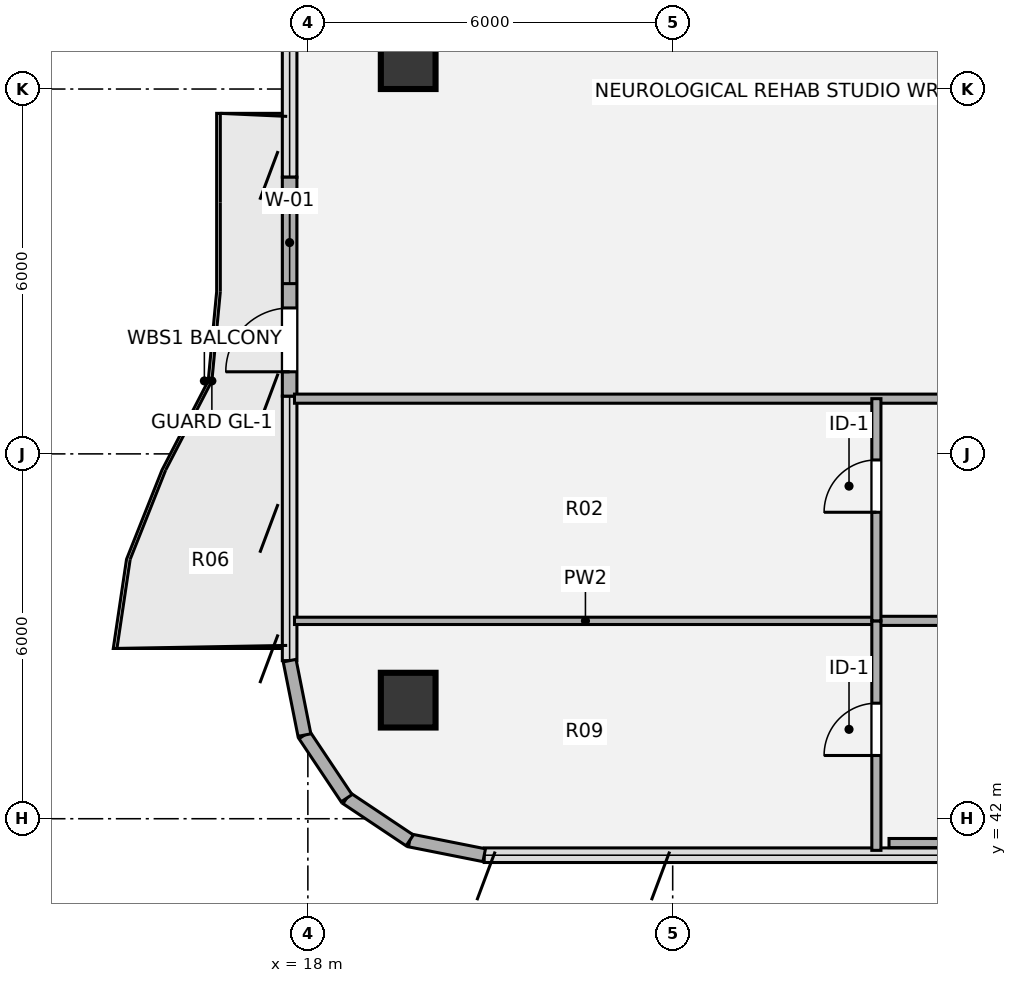
"""IFC4 building model, lengths in metres.
Left out: names, types, materials, properties, quantities, classifications, styles, units other than length and angle.
Written with IfcOpenShell. Run it as: python <this file> out.ifc"""

import sys

from ifc_helpers import new_model, si_unit, direction, frame, frame_2d, origin, origin_2d, place, context, subcontext, project, spatial, rectangle, hollow_circle, extrude, source, transform, mapped, element, fill, save


model = new_model("IFC4")
c1 = context("Model", 3, precision=1e-05, world=origin(), true_north=direction((0.0, 1.0)))
c2 = subcontext(c1, "Body", "Model", "MODEL_VIEW")
j1 = project(units=[si_unit("LENGTHUNIT", "METRE"), si_unit("PLANEANGLEUNIT", "RADIAN")], contexts=[c1])
p1 = place(None, origin())
s1 = spatial("IfcSite", under=j1, at=p1, CompositionType="ELEMENT")
p2 = place(p1, origin())
s2 = spatial("IfcBuilding", under=s1, at=p2, CompositionType="ELEMENT")
p3 = place(p2, frame((0.0, 0.0, 249.48)))
s3 = spatial("IfcBuildingStorey", under=s2, at=p3, CompositionType="ELEMENT", Elevation=249.48)
m1 = source(origin(), c2, "Body", "SweptSolid", [
    extrude(hollow_circle(Radius=0.45, WallThickness=0.032, at=origin_2d()), origin(), (0.0, 0.0, 1.0), 3.78),
])
for number, where, z_axis, x_axis in (
    (1, (19.65, 43.95, 0.0), (0.0, 0.0, 1.0), (1.0, 0.0, 0.0)),
    (2, (19.65, 54.45, 0.0), (0.0, 0.0, 1.0), (1.0, 0.0, 0.0)),
):
    element("IfcColumn", number, at=place(p3, frame(where, z_axis=z_axis, x_axis=x_axis)), inside=s3, PredefinedType="COLUMN", context=c2, shape_type="MappedRepresentation", body=[
        mapped(m1, transform((0.0, 0.0, 0.0), x_axis=(1.0, 0.0, 0.0), y_axis=(0.0, 1.0, 0.0), z_axis=(0.0, 0.0, 1.0), scale=1.0)),
    ])
for number, where, z_axis, x_axis in (
    (3, (20.9, 41.4, 0.0), (0.0, 0.0, 1.0), (-0.981, 0.195, 0.0)),
    (4, (19.675, 41.644, 0.0), (0.0, 0.0, 1.0), (-0.831, 0.556, 0.0)),
    (5, (18.637, 42.337, 0.0), (0.0, 0.0, 1.0), (-0.556, 0.831, 0.0)),
    (6, (17.944, 43.375, 0.0), (0.0, 0.0, 1.0), (-0.195, 0.981, 0.0)),
):
    element("IfcWall", number, at=place(p3, frame(where, z_axis=z_axis, x_axis=x_axis)), inside=s3, PredefinedType="SOLIDWALL", context=c2, shape_type="SweptSolid", body=[
        extrude(rectangle(XDim=1.249, YDim=0.215, at=frame_2d((0.624, 0.0))), origin(), (0.0, 0.0, 1.0), 3.53),
    ])
p4 = place(p3, frame((17.7, 48.95, 0.0), z_axis=(0.0, 0.0, 1.0), x_axis=(0.0, 1.0, 0.0)))
e7 = element("IfcWall", 7, at=p4, inside=s3, PredefinedType="SOLIDWALL", context=c2, shape_type="SweptSolid", body=[
    extrude(rectangle(XDim=3.6, YDim=0.24, at=frame_2d((1.8, 0.0))), origin(), (0.0, 0.0, 1.0), 3.53),
])
p5 = place(p4, frame((0.4, 0.0, 0.0)))
e8 = element("IfcOpeningElement", 8, at=p5, cuts=e7, PredefinedType="OPENING", context=c2, shape_type="SweptSolid", body=[
    extrude(rectangle(XDim=1.05, YDim=2.15, at=origin_2d()), frame((0.525, 0.13, 1.075), z_axis=(0.0, -1.0, 0.0), x_axis=(1.0, 0.0, 0.0)), (0.0, 0.0, 1.0), 0.26),
])
p6 = place(p4, frame((1.85, 0.0, 0.85)))
e9 = element("IfcOpeningElement", 9, at=p6, cuts=e7, PredefinedType="OPENING", context=c2, shape_type="SweptSolid", body=[
    extrude(rectangle(XDim=1.35, YDim=1.35, at=origin_2d()), frame((0.675, 0.13, 0.675), z_axis=(0.0, -1.0, 0.0), x_axis=(1.0, 0.0, 0.0)), (0.0, 0.0, 1.0), 0.26),
])
p7 = place(p3, frame((27.558, 41.6, 0.0), z_axis=(0.0, 0.0, 1.0), x_axis=(1.0, 0.0, 0.0)))
e10 = element("IfcWall", 10, at=p7, inside=s3, PredefinedType="PARTITIONING", context=c2, shape_type="SweptSolid", body=[
    extrude(rectangle(XDim=5.992, YDim=0.15, at=frame_2d((2.996, 0.0))), origin(), (0.0, 0.0, 1.0), 3.5),
])
p8 = place(p3, frame((17.78, 45.254, 0.0), z_axis=(0.0, 0.0, 1.0), x_axis=(1.0, 0.0, 0.0)))
e11 = element("IfcWall", 11, at=p8, inside=s3, PredefinedType="PARTITIONING", context=c2, shape_type="SweptSolid", body=[
    extrude(rectangle(XDim=9.57, YDim=0.12, at=frame_2d((4.785, 0.0))), origin(), (0.0, 0.0, 1.0), 2.982),
])
p9 = place(p3, frame((27.35, 45.254, 0.0), z_axis=(0.0, 0.0, 1.0), x_axis=(1.0, 0.0, 0.0)))
e12 = element("IfcWall", 12, at=p9, inside=s3, PredefinedType="PARTITIONING", context=c2, shape_type="SweptSolid", body=[
    extrude(rectangle(XDim=6.2, YDim=0.15, at=frame_2d((3.1, 0.0))), origin(), (0.0, 0.0, 1.0), 2.982),
])
p10 = place(p3, frame((17.78, 48.908, 0.0), z_axis=(0.0, 0.0, 1.0), x_axis=(1.0, 0.0, 0.0)))
e13 = element("IfcWall", 13, at=p10, inside=s3, PredefinedType="PARTITIONING", context=c2, shape_type="SweptSolid", body=[
    extrude(rectangle(XDim=15.77, YDim=0.15, at=frame_2d((7.885, 0.0))), origin(), (0.0, 0.0, 1.0), 2.982),
])
p11 = place(p3, frame((27.35, 41.48, 0.0), z_axis=(0.0, 0.0, 1.0), x_axis=(0.0, 1.0, 0.0)))
e14 = element("IfcWall", 14, at=p11, inside=s3, PredefinedType="PARTITIONING", context=c2, shape_type="SweptSolid", body=[
    extrude(rectangle(XDim=3.774, YDim=0.15, at=frame_2d((1.887, 0.0))), origin(), (0.0, 0.0, 1.0), 3.5),
])
p12 = place(p11, frame((1.56, 0.0, 0.0)))
e15 = element("IfcOpeningElement", 15, at=p12, cuts=e14, PredefinedType="OPENING", context=c2, shape_type="SweptSolid", body=[
    extrude(rectangle(XDim=0.86, YDim=2.1, at=origin_2d()), frame((0.43, 0.085, 1.05), z_axis=(0.0, -1.0, 0.0), x_axis=(1.0, 0.0, 0.0)), (0.0, 0.0, 1.0), 0.17),
])
p13 = place(p3, frame((27.35, 45.254, 0.0), z_axis=(0.0, 0.0, 1.0), x_axis=(0.0, 1.0, 0.0)))
e16 = element("IfcWall", 16, at=p13, inside=s3, PredefinedType="PARTITIONING", context=c2, shape_type="SweptSolid", body=[
    extrude(rectangle(XDim=3.654, YDim=0.15, at=frame_2d((1.827, 0.0))), origin(), (0.0, 0.0, 1.0), 3.5),
])
p14 = place(p13, frame((1.786, 0.0, 0.0)))
e17 = element("IfcOpeningElement", 17, at=p14, cuts=e16, PredefinedType="OPENING", context=c2, shape_type="SweptSolid", body=[
    extrude(rectangle(XDim=0.86, YDim=2.1, at=origin_2d()), frame((0.43, 0.085, 1.05), z_axis=(0.0, -1.0, 0.0), x_axis=(1.0, 0.0, 0.0)), (0.0, 0.0, 1.0), 0.17),
])
m2 = source(origin(), c2, "Body", "SweptSolid", [
    extrude(rectangle(XDim=1.05, YDim=2.15, at=origin_2d()), frame((0.525, 0.025, 1.075), z_axis=(0.0, -1.0, 0.0), x_axis=(1.0, 0.0, 0.0)), (0.0, 0.0, 1.0), 0.05),
])
p15 = place(p5, origin())
e18 = element("IfcDoor", 18, at=p15, inside=s3, OperationType="SINGLE_SWING_LEFT", PredefinedType="DOOR", context=c2, shape_type="MappedRepresentation", body=[
    mapped(m2, transform((0.0, 0.0, 0.0), x_axis=(1.0, 0.0, 0.0), y_axis=(0.0, 1.0, 0.0), z_axis=(0.0, 0.0, 1.0), scale=1.0)),
])
fill(e8, e18)
m3 = source(origin(), c2, "Body", "SweptSolid", [
    extrude(rectangle(XDim=1.35, YDim=1.35, at=origin_2d()), frame((0.675, 0.03, 0.675), z_axis=(0.0, -1.0, 0.0), x_axis=(1.0, 0.0, 0.0)), (0.0, 0.0, 1.0), 0.06),
])
p16 = place(p6, origin())
e19 = element("IfcWindow", 19, at=p16, inside=s3, PartitioningType="SINGLE_PANEL", PredefinedType="WINDOW", context=c2, shape_type="MappedRepresentation", body=[
    mapped(m3, transform((0.0, 0.0, 0.0), x_axis=(1.0, 0.0, 0.0), y_axis=(0.0, 1.0, 0.0), z_axis=(0.0, 0.0, 1.0), scale=1.0)),
])
fill(e9, e19)
m4 = source(origin(), c2, "Body", "SweptSolid", [
    extrude(rectangle(XDim=0.86, YDim=2.1, at=origin_2d()), frame((0.43, 0.025, 1.05), z_axis=(0.0, -1.0, 0.0), x_axis=(1.0, 0.0, 0.0)), (0.0, 0.0, 1.0), 0.05),
])
p17 = place(p12, origin())
e20 = element("IfcDoor", 20, at=p17, inside=s3, OperationType="SINGLE_SWING_LEFT", PredefinedType="DOOR", context=c2, shape_type="MappedRepresentation", body=[
    mapped(m4, transform((0.0, 0.0, 0.0), x_axis=(1.0, 0.0, 0.0), y_axis=(0.0, 1.0, 0.0), z_axis=(0.0, 0.0, 1.0), scale=1.0)),
])
fill(e15, e20)
p18 = place(p14, origin())
e21 = element("IfcDoor", 21, at=p18, inside=s3, OperationType="SINGLE_SWING_LEFT", PredefinedType="DOOR", context=c2, shape_type="MappedRepresentation", body=[
    mapped(m4, transform((0.0, 0.0, 0.0), x_axis=(1.0, 0.0, 0.0), y_axis=(0.0, 1.0, 0.0), z_axis=(0.0, 0.0, 1.0), scale=1.0)),
])
fill(e17, e21)
save(model, sys.argv[1])
